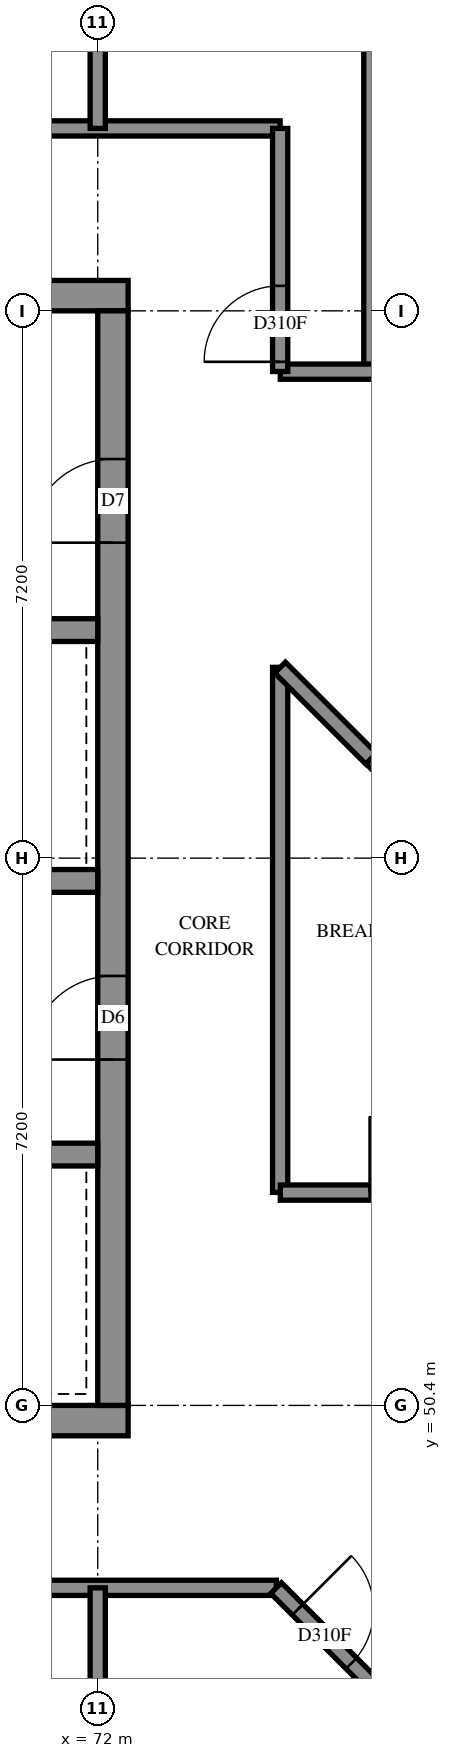
"""IFC4 building model, lengths in metres.
Left out: names, types, materials, properties, quantities, classifications, styles, units other than length and angle.
Written with IfcOpenShell. Run it as: python <this file> out.ifc"""

import sys

from ifc_helpers import new_model, si_unit, direction, frame, frame_2d, origin, place, context, subcontext, project, spatial, rectangle, extrude, element, fill, save


model = new_model("IFC4")
c1 = context("Model", 3, precision=1e-05, world=origin(), true_north=direction((0.0, 1.0)))
c2 = subcontext(c1, "Body", "Model", "MODEL_VIEW")
j1 = project(units=[si_unit("LENGTHUNIT", "METRE"), si_unit("PLANEANGLEUNIT", "RADIAN")], contexts=[c1])
p1 = place(None, origin())
s1 = spatial("IfcSite", under=j1, at=p1, CompositionType="ELEMENT")
p2 = place(p1, origin())
s2 = spatial("IfcBuilding", under=s1, at=p2, CompositionType="ELEMENT")
p3 = place(p2, frame((0.0, 0.0, 277.8)))
s3 = spatial("IfcBuildingStorey", under=s2, at=p3, CompositionType="ELEMENT", Elevation=277.8)
p4 = place(p3, frame((57.2, 50.2, -0.3), z_axis=(0.0, 0.0, 1.0), x_axis=(1.0, 0.0, 0.0)))
e1 = element("IfcWall", 1, at=p4, inside=s3, PredefinedType="SHEAR", context=c2, shape_type="SweptSolid", body=[
    extrude(rectangle(XDim=15.2, YDim=0.4, at=frame_2d((7.6, 0.0))), origin(), (0.0, 0.0, 1.0), 2.7),
])
p5 = place(p3, frame((57.2, 65.0, -0.3), z_axis=(0.0, 0.0, 1.0), x_axis=(1.0, 0.0, 0.0)))
e2 = element("IfcWall", 2, at=p5, inside=s3, PredefinedType="SHEAR", context=c2, shape_type="SweptSolid", body=[
    extrude(rectangle(XDim=15.2, YDim=0.4, at=frame_2d((7.6, 0.0))), origin(), (0.0, 0.0, 1.0), 2.7),
])
p6 = place(p5, frame((10.4, 0.0, 0.3)))
e3 = element("IfcOpeningElement", 3, at=p6, cuts=e2, PredefinedType="OPENING", context=c2, shape_type="SweptSolid", body=[
    extrude(rectangle(XDim=0.8, YDim=2.1, at=frame_2d((0.4, 1.05))), frame((0.0, 0.21, 0.0), z_axis=(0.0, -1.0, 0.0), x_axis=(1.0, 0.0, 0.0)), (0.0, 0.0, 1.0), 0.42),
])
p7 = place(p3, frame((72.2, 50.4, -0.3), z_axis=(0.0, 0.0, 1.0), x_axis=(0.0, 1.0, 0.0)))
e4 = element("IfcWall", 4, at=p7, inside=s3, PredefinedType="SHEAR", context=c2, shape_type="SweptSolid", body=[
    extrude(rectangle(XDim=14.4, YDim=0.4, at=frame_2d((7.2, 0.0))), origin(), (0.0, 0.0, 1.0), 2.7),
])
p8 = place(p7, frame((4.55, 0.0, 0.3)))
e5 = element("IfcOpeningElement", 5, at=p8, cuts=e4, PredefinedType="OPENING", context=c2, shape_type="SweptSolid", body=[
    extrude(rectangle(XDim=1.1, YDim=2.1, at=frame_2d((0.55, 1.05))), frame((0.0, 0.21, 0.0), z_axis=(0.0, -1.0, 0.0), x_axis=(1.0, 0.0, 0.0)), (0.0, 0.0, 1.0), 0.42),
])
p9 = place(p7, frame((11.35, 0.0, 0.3)))
e6 = element("IfcOpeningElement", 6, at=p9, cuts=e4, PredefinedType="OPENING", context=c2, shape_type="SweptSolid", body=[
    extrude(rectangle(XDim=1.1, YDim=2.1, at=frame_2d((0.55, 1.05))), frame((0.0, 0.21, 0.0), z_axis=(0.0, -1.0, 0.0), x_axis=(1.0, 0.0, 0.0)), (0.0, 0.0, 1.0), 0.42),
])
p10 = place(p3, frame((57.6, 53.7, 0.0), z_axis=(0.0, 0.0, 1.0), x_axis=(1.0, 0.0, 0.0)))
e7 = element("IfcWall", 7, at=p10, inside=s3, PredefinedType="SOLIDWALL", context=c2, shape_type="SweptSolid", body=[
    extrude(rectangle(XDim=14.4, YDim=0.3, at=frame_2d((7.2, 0.0))), origin(), (0.0, 0.0, 1.0), 3.1),
])
p11 = place(p10, frame((1.35, 0.0, 0.0)))
e8 = element("IfcOpeningElement", 8, at=p11, cuts=e7, PredefinedType="OPENING", context=c2, shape_type="SweptSolid", body=[
    extrude(rectangle(XDim=0.9, YDim=2.1, at=frame_2d((0.45, 1.05))), frame((0.0, 0.16, 0.0), z_axis=(0.0, -1.0, 0.0), x_axis=(1.0, 0.0, 0.0)), (0.0, 0.0, 1.0), 0.32),
])
p12 = place(p10, frame((4.95, 0.0, 0.0)))
e9 = element("IfcOpeningElement", 9, at=p12, cuts=e7, PredefinedType="OPENING", context=c2, shape_type="SweptSolid", body=[
    extrude(rectangle(XDim=0.9, YDim=2.1, at=frame_2d((0.45, 1.05))), frame((0.0, 0.16, 0.0), z_axis=(0.0, -1.0, 0.0), x_axis=(1.0, 0.0, 0.0)), (0.0, 0.0, 1.0), 0.32),
])
p13 = place(p10, frame((8.55, 0.0, 0.0)))
e10 = element("IfcOpeningElement", 10, at=p13, cuts=e7, PredefinedType="OPENING", context=c2, shape_type="SweptSolid", body=[
    extrude(rectangle(XDim=0.9, YDim=2.1, at=frame_2d((0.45, 1.05))), frame((0.0, 0.16, 0.0), z_axis=(0.0, -1.0, 0.0), x_axis=(1.0, 0.0, 0.0)), (0.0, 0.0, 1.0), 0.32),
])
p14 = place(p10, frame((12.05, 0.0, 0.0)))
e11 = element("IfcOpeningElement", 11, at=p14, cuts=e7, PredefinedType="OPENING", context=c2, shape_type="SweptSolid", body=[
    extrude(rectangle(XDim=1.1, YDim=2.1, at=frame_2d((0.55, 1.05))), frame((0.0, 0.16, 0.0), z_axis=(0.0, -1.0, 0.0), x_axis=(1.0, 0.0, 0.0)), (0.0, 0.0, 1.0), 0.32),
])
p15 = place(p3, frame((57.6, 57.3, 0.0), z_axis=(0.0, 0.0, 1.0), x_axis=(1.0, 0.0, 0.0)))
e12 = element("IfcWall", 12, at=p15, inside=s3, PredefinedType="SOLIDWALL", context=c2, shape_type="SweptSolid", body=[
    extrude(rectangle(XDim=14.4, YDim=0.3, at=frame_2d((7.2, 0.0))), origin(), (0.0, 0.0, 1.0), 3.1),
])
p16 = place(p15, frame((8.55, 0.0, 0.0)))
e13 = element("IfcOpeningElement", 13, at=p16, cuts=e12, PredefinedType="OPENING", context=c2, shape_type="SweptSolid", body=[
    extrude(rectangle(XDim=0.9, YDim=2.1, at=frame_2d((0.45, 1.05))), frame((0.0, 0.16, 0.0), z_axis=(0.0, -1.0, 0.0), x_axis=(1.0, 0.0, 0.0)), (0.0, 0.0, 1.0), 0.32),
])
p17 = place(p15, frame((1.25, 0.0, 0.0)))
e14 = element("IfcOpeningElement", 14, at=p17, cuts=e12, PredefinedType="OPENING", context=c2, shape_type="SweptSolid", body=[
    extrude(rectangle(XDim=1.1, YDim=2.1, at=frame_2d((0.55, 1.05))), frame((0.0, 0.16, 0.0), z_axis=(0.0, -1.0, 0.0), x_axis=(1.0, 0.0, 0.0)), (0.0, 0.0, 1.0), 0.32),
])
p18 = place(p15, frame((4.85, 0.0, 0.0)))
e15 = element("IfcOpeningElement", 15, at=p18, cuts=e12, PredefinedType="OPENING", context=c2, shape_type="SweptSolid", body=[
    extrude(rectangle(XDim=1.1, YDim=2.1, at=frame_2d((0.55, 1.05))), frame((0.0, 0.16, 0.0), z_axis=(0.0, -1.0, 0.0), x_axis=(1.0, 0.0, 0.0)), (0.0, 0.0, 1.0), 0.32),
])
p19 = place(p15, frame((12.05, 0.0, 0.0)))
e16 = element("IfcOpeningElement", 16, at=p19, cuts=e12, PredefinedType="OPENING", context=c2, shape_type="SweptSolid", body=[
    extrude(rectangle(XDim=1.1, YDim=2.1, at=frame_2d((0.55, 1.05))), frame((0.0, 0.16, 0.0), z_axis=(0.0, -1.0, 0.0), x_axis=(1.0, 0.0, 0.0)), (0.0, 0.0, 1.0), 0.32),
])
p20 = place(p3, frame((64.8, 60.6, 0.0), z_axis=(0.0, 0.0, 1.0), x_axis=(1.0, 0.0, 0.0)))
e17 = element("IfcWall", 17, at=p20, inside=s3, PredefinedType="SOLIDWALL", context=c2, shape_type="SweptSolid", body=[
    extrude(rectangle(XDim=7.2, YDim=0.3, at=frame_2d((3.6, 0.0))), origin(), (0.0, 0.0, 1.0), 3.1),
])
p21 = place(p3, frame((55.2, 67.2, 0.0), z_axis=(0.0, 0.0, 1.0), x_axis=(1.0, 0.0, 0.0)))
e18 = element("IfcWall", 18, at=p21, inside=s3, PredefinedType="PARTITIONING", context=c2, shape_type="SweptSolid", body=[
    extrude(rectangle(XDim=19.2, YDim=0.2, at=frame_2d((9.6, 0.0))), origin(), (0.0, 0.0, 1.0), 3.1),
])
p22 = place(p21, frame((6.261, 0.0, 0.0)))
e19 = element("IfcOpeningElement", 19, at=p22, cuts=e18, PredefinedType="OPENING", context=c2, shape_type="SweptSolid", body=[
    extrude(rectangle(XDim=0.9, YDim=2.1, at=frame_2d((0.45, 1.05))), frame((0.0, 0.11, 0.0), z_axis=(0.0, -1.0, 0.0), x_axis=(1.0, 0.0, 0.0)), (0.0, 0.0, 1.0), 0.22),
])
p23 = place(p21, frame((11.675, 0.0, 0.0)))
e20 = element("IfcOpeningElement", 20, at=p23, cuts=e18, PredefinedType="OPENING", context=c2, shape_type="SweptSolid", body=[
    extrude(rectangle(XDim=1.0, YDim=2.1, at=frame_2d((0.5, 1.05))), frame((0.0, 0.11, 0.0), z_axis=(0.0, -1.0, 0.0), x_axis=(1.0, 0.0, 0.0)), (0.0, 0.0, 1.0), 0.22),
])
p24 = place(p21, frame((13.88, 0.0, 0.0)))
e21 = element("IfcOpeningElement", 21, at=p24, cuts=e18, PredefinedType="OPENING", context=c2, shape_type="SweptSolid", body=[
    extrude(rectangle(XDim=1.0, YDim=2.1, at=frame_2d((0.5, 1.05))), frame((0.0, 0.11, 0.0), z_axis=(0.0, -1.0, 0.0), x_axis=(1.0, 0.0, 0.0)), (0.0, 0.0, 1.0), 0.22),
])
p25 = place(p3, frame((55.2, 48.0, 0.0), z_axis=(0.0, 0.0, 1.0), x_axis=(1.0, 0.0, 0.0)))
e22 = element("IfcWall", 22, at=p25, inside=s3, PredefinedType="PARTITIONING", context=c2, shape_type="SweptSolid", body=[
    extrude(rectangle(XDim=19.15, YDim=0.2, at=frame_2d((9.575, 0.0))), origin(), (0.0, 0.0, 1.0), 3.1),
])
p26 = place(p25, frame((4.475, 0.0, 0.0)))
e23 = element("IfcOpeningElement", 23, at=p26, cuts=e22, PredefinedType="OPENING", context=c2, shape_type="SweptSolid", body=[
    extrude(rectangle(XDim=1.0, YDim=2.1, at=frame_2d((0.5, 1.05))), frame((0.0, 0.11, 0.0), z_axis=(0.0, -1.0, 0.0), x_axis=(1.0, 0.0, 0.0)), (0.0, 0.0, 1.0), 0.22),
])
p27 = place(p25, frame((6.525, 0.0, 0.0)))
e24 = element("IfcOpeningElement", 24, at=p27, cuts=e22, PredefinedType="OPENING", context=c2, shape_type="SweptSolid", body=[
    extrude(rectangle(XDim=1.0, YDim=2.1, at=frame_2d((0.5, 1.05))), frame((0.0, 0.11, 0.0), z_axis=(0.0, -1.0, 0.0), x_axis=(1.0, 0.0, 0.0)), (0.0, 0.0, 1.0), 0.22),
])
p28 = place(p25, frame((13.463, 0.0, 0.0)))
e25 = element("IfcOpeningElement", 25, at=p28, cuts=e22, PredefinedType="OPENING", context=c2, shape_type="SweptSolid", body=[
    extrude(rectangle(XDim=1.0, YDim=2.1, at=frame_2d((0.5, 1.05))), frame((0.0, 0.11, 0.0), z_axis=(0.0, -1.0, 0.0), x_axis=(1.0, 0.0, 0.0)), (0.0, 0.0, 1.0), 0.22),
])
p29 = place(p3, frame((75.6, 64.0, 0.0), z_axis=(0.0, 0.0, 1.0), x_axis=(0.0, 1.0, 0.0)))
e26 = element("IfcWall", 26, at=p29, inside=s3, PredefinedType="PARTITIONING", context=c2, shape_type="SweptSolid", body=[
    extrude(rectangle(XDim=8.75, YDim=0.2, at=frame_2d((4.375, 0.0))), origin(), (0.0, 0.0, 1.0), 3.1),
])
p30 = place(p3, frame((74.4, 53.202, 0.0), z_axis=(0.0, 0.0, 1.0), x_axis=(0.0, 1.0, 0.0)))
e27 = element("IfcWall", 27, at=p30, inside=s3, PredefinedType="PARTITIONING", context=c2, shape_type="SweptSolid", body=[
    extrude(rectangle(XDim=6.908, YDim=0.2, at=frame_2d((3.454, 0.0))), origin(), (0.0, 0.0, 1.0), 3.1),
])
p31 = place(p3, frame((74.402, 64.0, 0.0), z_axis=(0.0, 0.0, 1.0), x_axis=(1.0, 0.0, 0.0)))
e28 = element("IfcWall", 28, at=p31, inside=s3, PredefinedType="PARTITIONING", context=c2, shape_type="SweptSolid", body=[
    extrude(rectangle(XDim=4.798, YDim=0.2, at=frame_2d((2.399, 0.0))), origin(), (0.0, 0.0, 1.0), 3.1),
])
p32 = place(p31, frame((1.723, 0.0, 0.0)))
e29 = element("IfcOpeningElement", 29, at=p32, cuts=e28, PredefinedType="OPENING", context=c2, shape_type="SweptSolid", body=[
    extrude(rectangle(XDim=1.0, YDim=2.1, at=frame_2d((0.5, 1.05))), frame((0.0, 0.11, 0.0), z_axis=(0.0, -1.0, 0.0), x_axis=(1.0, 0.0, 0.0)), (0.0, 0.0, 1.0), 0.22),
])
p33 = place(p3, frame((74.347, 47.997, 0.0), z_axis=(0.0, 0.0, 1.0), x_axis=(0.7071067812, -0.7071067812, 0.0)))
e30 = element("IfcWall", 30, at=p33, inside=s3, PredefinedType="PARTITIONING", context=c2, shape_type="SweptSolid", body=[
    extrude(rectangle(XDim=4.596, YDim=0.2, at=frame_2d((2.298, 0.0))), origin(), (0.0, 0.0, 1.0), 3.1),
])
p34 = place(p33, frame((0.401, 0.0, 0.0)))
e31 = element("IfcOpeningElement", 31, at=p34, cuts=e30, PredefinedType="OPENING", context=c2, shape_type="SweptSolid", body=[
    extrude(rectangle(XDim=1.0, YDim=2.1, at=frame_2d((0.5, 1.05))), frame((0.0, 0.11, 0.0), z_axis=(0.0, -1.0, 0.0), x_axis=(1.0, 0.0, 0.0)), (0.0, 0.0, 1.0), 0.22),
])
p35 = place(p3, frame((72.0, 43.55, 0.0), z_axis=(0.0, 0.0, 1.0), x_axis=(0.0, 1.0, 0.0)))
e32 = element("IfcWall", 32, at=p35, inside=s3, PredefinedType="PARTITIONING", context=c2, shape_type="SweptSolid", body=[
    extrude(rectangle(XDim=4.45, YDim=0.2, at=frame_2d((2.225, 0.0))), origin(), (0.0, 0.0, 1.0), 3.1),
])
p36 = place(p3, frame((72.0, 67.2, 0.0), z_axis=(0.0, 0.0, 1.0), x_axis=(0.0, 1.0, 0.0)))
e33 = element("IfcWall", 33, at=p36, inside=s3, PredefinedType="PARTITIONING", context=c2, shape_type="SweptSolid", body=[
    extrude(rectangle(XDim=4.346, YDim=0.2, at=frame_2d((2.173, 0.0))), origin(), (0.0, 0.0, 1.0), 3.1),
])
p37 = place(p3, frame((74.4, 64.002, 0.0), z_axis=(0.0, 0.0, 1.0), x_axis=(0.0, 1.0, 0.0)))
e34 = element("IfcWall", 34, at=p37, inside=s3, PredefinedType="PARTITIONING", context=c2, shape_type="SweptSolid", body=[
    extrude(rectangle(XDim=3.198, YDim=0.2, at=frame_2d((1.599, 0.0))), origin(), (0.0, 0.0, 1.0), 3.1),
])
p38 = place(p37, frame((0.127, 0.0, 0.0)))
e35 = element("IfcOpeningElement", 35, at=p38, cuts=e34, PredefinedType="OPENING", context=c2, shape_type="SweptSolid", body=[
    extrude(rectangle(XDim=1.0, YDim=2.1, at=frame_2d((0.5, 1.05))), frame((0.0, 0.11, 0.0), z_axis=(0.0, -1.0, 0.0), x_axis=(1.0, 0.0, 0.0)), (0.0, 0.0, 1.0), 0.22),
])
p39 = place(p3, frame((74.402, 53.2, 0.0), z_axis=(0.0, 0.0, 1.0), x_axis=(1.0, 0.0, 0.0)))
e36 = element("IfcWall", 36, at=p39, inside=s3, PredefinedType="PARTITIONING", context=c2, shape_type="SweptSolid", body=[
    extrude(rectangle(XDim=2.968, YDim=0.2, at=frame_2d((1.484, 0.0))), origin(), (0.0, 0.0, 1.0), 3.1),
])
p40 = place(p39, frame((1.175, 0.0, 0.0)))
e37 = element("IfcOpeningElement", 37, at=p40, cuts=e36, PredefinedType="OPENING", context=c2, shape_type="SweptSolid", body=[
    extrude(rectangle(XDim=1.0, YDim=2.1, at=frame_2d((0.5, 1.05))), frame((0.0, 0.11, 0.0), z_axis=(0.0, -1.0, 0.0), x_axis=(1.0, 0.0, 0.0)), (0.0, 0.0, 1.0), 0.22),
])
p41 = place(p3, frame((75.601, 58.913, 0.0), z_axis=(0.0, 0.0, 1.0), x_axis=(0.707460777, -0.7067526081, 0.0)))
e38 = element("IfcWall", 38, at=p41, inside=s3, PredefinedType="PARTITIONING", context=c2, shape_type="SweptSolid", body=[
    extrude(rectangle(XDim=2.824, YDim=0.2, at=frame_2d((1.412, 0.0))), origin(), (0.0, 0.0, 1.0), 3.1),
])
p42 = place(p3, frame((74.399, 60.107, 0.0), z_axis=(0.0, 0.0, 1.0), x_axis=(0.7071067812, -0.7071067812, 0.0)))
e39 = element("IfcWall", 39, at=p42, inside=s3, PredefinedType="PARTITIONING", context=c2, shape_type="SweptSolid", body=[
    extrude(rectangle(XDim=1.694, YDim=0.2, at=frame_2d((0.847, 0.0))), origin(), (0.0, 0.0, 1.0), 3.1),
])
p43 = place(p8, origin())
e40 = element("IfcDoor", 40, at=p43, inside=s3, OperationType="DOUBLE_DOOR_SINGLE_SWING", PredefinedType="DOOR", context=c2, shape_type="SweptSolid", body=[
    extrude(rectangle(XDim=1.1, YDim=2.1, at=frame_2d((0.55, 1.05))), frame((0.0, 0.025, 0.0), z_axis=(0.0, -1.0, 0.0), x_axis=(1.0, 0.0, 0.0)), (0.0, 0.0, 1.0), 0.05),
])
fill(e5, e40)
p44 = place(p9, origin())
e41 = element("IfcDoor", 41, at=p44, inside=s3, OperationType="SINGLE_SWING_RIGHT", PredefinedType="DOOR", context=c2, shape_type="SweptSolid", body=[
    extrude(rectangle(XDim=1.1, YDim=2.1, at=frame_2d((0.55, 1.05))), frame((0.0, 0.025, 0.0), z_axis=(0.0, -1.0, 0.0), x_axis=(1.0, 0.0, 0.0)), (0.0, 0.0, 1.0), 0.05),
])
fill(e6, e41)
p45 = place(p40, origin())
e42 = element("IfcDoor", 42, at=p45, inside=s3, OperationType="SINGLE_SWING_LEFT", PredefinedType="DOOR", context=c2, shape_type="SweptSolid", body=[
    extrude(rectangle(XDim=1.0, YDim=2.1, at=frame_2d((0.5, 1.05))), frame((0.0, 0.025, 0.0), z_axis=(0.0, -1.0, 0.0), x_axis=(1.0, 0.0, 0.0)), (0.0, 0.0, 1.0), 0.05),
])
fill(e37, e42)
p46 = place(p38, origin())
e43 = element("IfcDoor", 43, at=p46, inside=s3, OperationType="SINGLE_SWING_RIGHT", PredefinedType="DOOR", context=c2, shape_type="SweptSolid", body=[
    extrude(rectangle(XDim=1.0, YDim=2.1, at=frame_2d((0.5, 1.05))), frame((0.0, 0.025, 0.0), z_axis=(0.0, -1.0, 0.0), x_axis=(1.0, 0.0, 0.0)), (0.0, 0.0, 1.0), 0.05),
])
fill(e35, e43)
p47 = place(p34, origin())
e44 = element("IfcDoor", 44, at=p47, inside=s3, OperationType="SINGLE_SWING_LEFT", PredefinedType="DOOR", context=c2, shape_type="SweptSolid", body=[
    extrude(rectangle(XDim=1.0, YDim=2.1, at=frame_2d((0.5, 1.05))), frame((0.0, 0.025, 0.0), z_axis=(0.0, -1.0, 0.0), x_axis=(1.0, 0.0, 0.0)), (0.0, 0.0, 1.0), 0.05),
])
fill(e31, e44)
save(model, sys.argv[1])
